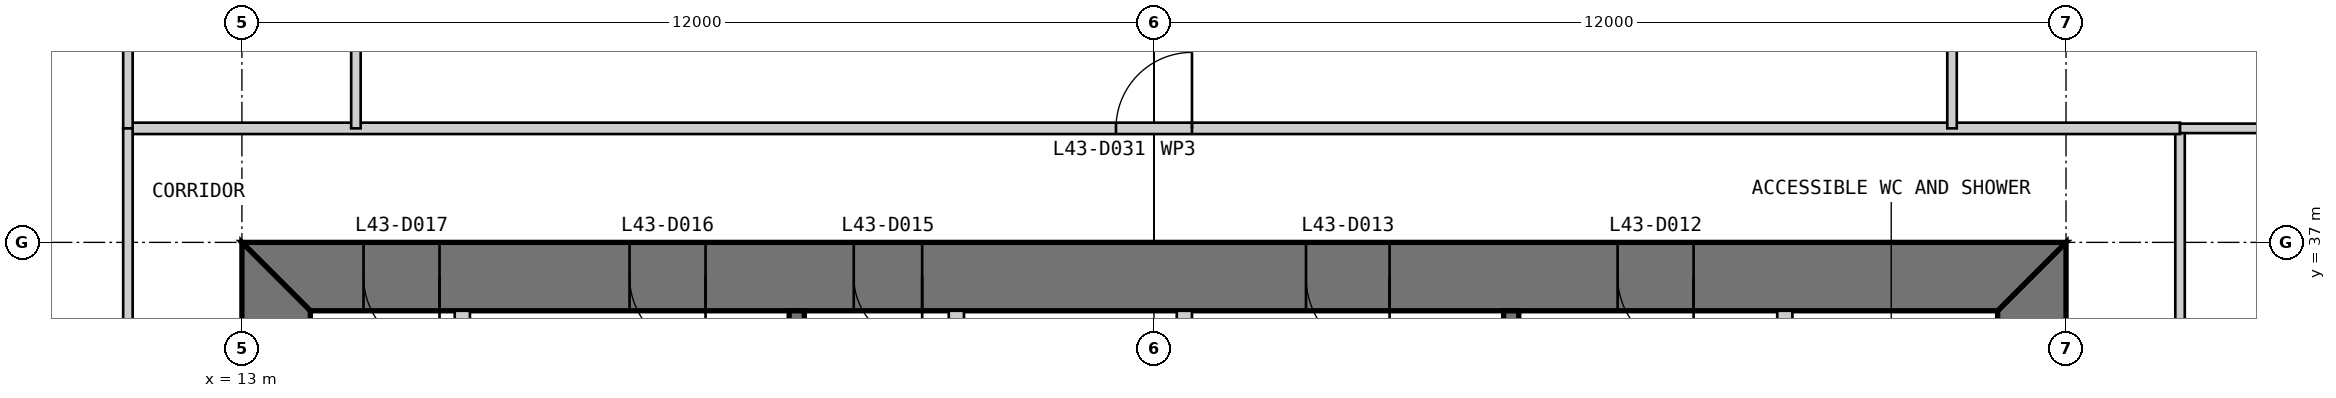
"""IFC4 building model, lengths in metres.
Left out: names, types, materials, properties, quantities, classifications, styles, units other than length and angle.
Written with IfcOpenShell. Run it as: python <this file> out.ifc"""

import sys

from ifc_helpers import new_model, si_unit, direction, frame, frame_2d, origin, place, context, subcontext, project, spatial, polyline, rectangle, outline, extrude, element, fill, save


model = new_model("IFC4")
c1 = context("Model", 3, precision=1e-05, world=origin(), true_north=direction((0.0, 1.0)))
c2 = subcontext(c1, "Body", "Model", "MODEL_VIEW")
j1 = project(units=[si_unit("LENGTHUNIT", "METRE"), si_unit("PLANEANGLEUNIT", "RADIAN")], contexts=[c1])
p1 = place(None, origin())
s1 = spatial("IfcSite", under=j1, at=p1, CompositionType="ELEMENT")
p2 = place(p1, origin())
s2 = spatial("IfcBuilding", under=s1, at=p2, CompositionType="ELEMENT")
p3 = place(p2, frame((0.0, 0.0, 185.8)))
s3 = spatial("IfcBuildingStorey", under=s2, at=p3, CompositionType="ELEMENT", Elevation=185.8)
p4 = place(p3, frame((36.55, 13.9, 0.0), z_axis=(0.0, 0.0, 1.0), x_axis=(0.0, 1.0, 0.0)))
e1 = element("IfcWall", 1, at=p4, inside=s3, PredefinedType="SHEAR", context=c2, shape_type="SweptSolid", body=[
    extrude(outline(polyline([(-0.9, -0.45), (23.1, -0.45), (22.2, 0.45), (0.0, 0.45), (-0.9, -0.45)])), origin(), (0.0, 0.0, 1.0), 4.0),
])
p5 = place(p4, frame((20.2, 0.0, 0.0)))
e2 = element("IfcOpeningElement", 2, at=p5, cuts=e1, PredefinedType="OPENING", context=c2, shape_type="SweptSolid", body=[
    extrude(rectangle(XDim=1.0, YDim=2.2, at=frame_2d((0.5, 1.1))), frame((0.0, 0.46, 0.0), z_axis=(0.0, -1.0, 0.0), x_axis=(1.0, 0.0, 0.0)), (0.0, 0.0, 1.0), 0.92),
])
p6 = place(p4, frame((17.25, 0.0, 0.0)))
e3 = element("IfcOpeningElement", 3, at=p6, cuts=e1, PredefinedType="OPENING", context=c2, shape_type="SweptSolid", body=[
    extrude(rectangle(XDim=0.9, YDim=2.2, at=frame_2d((0.45, 1.1))), frame((0.0, 0.46, 0.0), z_axis=(0.0, -1.0, 0.0), x_axis=(1.0, 0.0, 0.0)), (0.0, 0.0, 1.0), 0.92),
])
p7 = place(p3, frame((37.0, 36.55, 0.0), z_axis=(0.0, 0.0, 1.0), x_axis=(-1.0, 0.0, 0.0)))
e4 = element("IfcWall", 4, at=p7, inside=s3, PredefinedType="SHEAR", context=c2, shape_type="SweptSolid", body=[
    extrude(outline(polyline([(0.0, -0.45), (24.0, -0.45), (23.1, 0.45), (0.9, 0.45), (0.0, -0.45)])), origin(), (0.0, 0.0, 1.0), 4.0),
])
p8 = place(p7, frame((4.9, 0.0, 0.0)))
e5 = element("IfcOpeningElement", 5, at=p8, cuts=e4, PredefinedType="OPENING", context=c2, shape_type="SweptSolid", body=[
    extrude(rectangle(XDim=1.0, YDim=2.2, at=frame_2d((0.5, 1.1))), frame((0.0, 0.46, 0.0), z_axis=(0.0, -1.0, 0.0), x_axis=(1.0, 0.0, 0.0)), (0.0, 0.0, 1.0), 0.92),
])
p9 = place(p7, frame((8.9, 0.0, 0.0)))
e6 = element("IfcOpeningElement", 6, at=p9, cuts=e4, PredefinedType="OPENING", context=c2, shape_type="SweptSolid", body=[
    extrude(rectangle(XDim=1.1, YDim=2.2, at=frame_2d((0.55, 1.1))), frame((0.0, 0.46, 0.0), z_axis=(0.0, -1.0, 0.0), x_axis=(1.0, 0.0, 0.0)), (0.0, 0.0, 1.0), 0.92),
])
p10 = place(p7, frame((15.05, 0.0, 0.0)))
e7 = element("IfcOpeningElement", 7, at=p10, cuts=e4, PredefinedType="OPENING", context=c2, shape_type="SweptSolid", body=[
    extrude(rectangle(XDim=0.9, YDim=2.2, at=frame_2d((0.45, 1.1))), frame((0.0, 0.46, 0.0), z_axis=(0.0, -1.0, 0.0), x_axis=(1.0, 0.0, 0.0)), (0.0, 0.0, 1.0), 0.92),
])
p11 = place(p7, frame((17.9, 0.0, 0.0)))
e8 = element("IfcOpeningElement", 8, at=p11, cuts=e4, PredefinedType="OPENING", context=c2, shape_type="SweptSolid", body=[
    extrude(rectangle(XDim=1.0, YDim=2.2, at=frame_2d((0.5, 1.1))), frame((0.0, 0.46, 0.0), z_axis=(0.0, -1.0, 0.0), x_axis=(1.0, 0.0, 0.0)), (0.0, 0.0, 1.0), 0.92),
])
p12 = place(p7, frame((21.4, 0.0, 0.0)))
e9 = element("IfcOpeningElement", 9, at=p12, cuts=e4, PredefinedType="OPENING", context=c2, shape_type="SweptSolid", body=[
    extrude(rectangle(XDim=1.0, YDim=2.2, at=frame_2d((0.5, 1.1))), frame((0.0, 0.46, 0.0), z_axis=(0.0, -1.0, 0.0), x_axis=(1.0, 0.0, 0.0)), (0.0, 0.0, 1.0), 0.92),
])
p13 = place(p3, frame((13.45, 36.1, 0.0), z_axis=(0.0, 0.0, 1.0), x_axis=(0.0, -1.0, 0.0)))
e10 = element("IfcWall", 10, at=p13, inside=s3, PredefinedType="SHEAR", context=c2, shape_type="SweptSolid", body=[
    extrude(outline(polyline([(-0.9, -0.45), (23.1, -0.45), (22.2, 0.45), (0.0, 0.45), (-0.9, -0.45)])), origin(), (0.0, 0.0, 1.0), 4.0),
])
p14 = place(p13, frame((20.2, 0.0, 0.0)))
e11 = element("IfcOpeningElement", 11, at=p14, cuts=e10, PredefinedType="OPENING", context=c2, shape_type="SweptSolid", body=[
    extrude(rectangle(XDim=1.0, YDim=2.2, at=frame_2d((0.5, 1.1))), frame((0.0, 0.46, 0.0), z_axis=(0.0, -1.0, 0.0), x_axis=(1.0, 0.0, 0.0)), (0.0, 0.0, 1.0), 0.92),
])
p15 = place(p13, frame((17.25, 0.0, 0.0)))
e12 = element("IfcOpeningElement", 12, at=p15, cuts=e10, PredefinedType="OPENING", context=c2, shape_type="SweptSolid", body=[
    extrude(rectangle(XDim=0.9, YDim=2.2, at=frame_2d((0.45, 1.1))), frame((0.0, 0.46, 0.0), z_axis=(0.0, -1.0, 0.0), x_axis=(1.0, 0.0, 0.0)), (0.0, 0.0, 1.0), 0.92),
])
p16 = place(p3, frame((33.3, 36.1, 0.0), z_axis=(0.0, 0.0, 1.0), x_axis=(0.0, -1.0, 0.0)))
e13 = element("IfcWall", 13, at=p16, inside=s3, PredefinedType="PARTITIONING", context=c2, shape_type="SweptSolid", body=[
    extrude(rectangle(XDim=16.1, YDim=0.2, at=frame_2d((8.05, 0.0))), origin(), (0.0, 0.0, 1.0), 3.8),
])
p17 = place(p16, frame((4.4, 0.0, 0.0)))
e14 = element("IfcOpeningElement", 14, at=p17, cuts=e13, PredefinedType="OPENING", context=c2, shape_type="SweptSolid", body=[
    extrude(rectangle(XDim=0.9, YDim=2.2, at=frame_2d((0.45, 1.1))), frame((0.0, 0.11, 0.0), z_axis=(0.0, -1.0, 0.0), x_axis=(1.0, 0.0, 0.0)), (0.0, 0.0, 1.0), 0.22),
])
p18 = place(p3, frame((29.7, 36.1, 0.0), z_axis=(0.0, 0.0, 1.0), x_axis=(0.0, -1.0, 0.0)))
e15 = element("IfcWall", 15, at=p18, inside=s3, PredefinedType="SOLIDWALL", context=c2, shape_type="SweptSolid", body=[
    extrude(rectangle(XDim=16.1, YDim=0.2, at=frame_2d((8.05, 0.0))), origin(), (0.0, 0.0, 1.0), 3.8),
])
p19 = place(p18, frame((7.217, 0.0, 0.0)))
e16 = element("IfcOpeningElement", 16, at=p19, cuts=e15, PredefinedType="OPENING", context=c2, shape_type="SweptSolid", body=[
    extrude(rectangle(XDim=1.1, YDim=2.2, at=frame_2d((0.55, 1.1))), frame((0.0, 0.11, 0.0), z_axis=(0.0, -1.0, 0.0), x_axis=(1.0, 0.0, 0.0)), (0.0, 0.0, 1.0), 0.22),
])
p20 = place(p18, frame((10.55, 0.0, 0.0)))
e17 = element("IfcOpeningElement", 17, at=p20, cuts=e15, PredefinedType="OPENING", context=c2, shape_type="SweptSolid", body=[
    extrude(rectangle(XDim=1.1, YDim=2.2, at=frame_2d((0.55, 1.1))), frame((0.0, 0.11, 0.0), z_axis=(0.0, -1.0, 0.0), x_axis=(1.0, 0.0, 0.0)), (0.0, 0.0, 1.0), 0.22),
])
p21 = place(p18, frame((13.883, 0.0, 0.0)))
e18 = element("IfcOpeningElement", 18, at=p21, cuts=e15, PredefinedType="OPENING", context=c2, shape_type="SweptSolid", body=[
    extrude(rectangle(XDim=1.1, YDim=2.2, at=frame_2d((0.55, 1.1))), frame((0.0, 0.11, 0.0), z_axis=(0.0, -1.0, 0.0), x_axis=(1.0, 0.0, 0.0)), (0.0, 0.0, 1.0), 0.22),
])
p22 = place(p3, frame((25.4, 36.1, 0.0), z_axis=(0.0, 0.0, 1.0), x_axis=(0.0, -1.0, 0.0)))
e19 = element("IfcWall", 19, at=p22, inside=s3, PredefinedType="PARTITIONING", context=c2, shape_type="SweptSolid", body=[
    extrude(rectangle(XDim=3.3, YDim=0.2, at=frame_2d((1.65, 0.0))), origin(), (0.0, 0.0, 1.0), 3.8),
])
p23 = place(p22, frame((0.9, 0.0, 0.0)))
e20 = element("IfcOpeningElement", 20, at=p23, cuts=e19, PredefinedType="OPENING", context=c2, shape_type="SweptSolid", body=[
    extrude(rectangle(XDim=1.1, YDim=2.2, at=frame_2d((0.55, 1.1))), frame((0.0, 0.11, 0.0), z_axis=(0.0, -1.0, 0.0), x_axis=(1.0, 0.0, 0.0)), (0.0, 0.0, 1.0), 0.22),
])
p24 = place(p3, frame((22.4, 36.1, 0.0), z_axis=(0.0, 0.0, 1.0), x_axis=(0.0, -1.0, 0.0)))
e21 = element("IfcWall", 21, at=p24, inside=s3, PredefinedType="PARTITIONING", context=c2, shape_type="SweptSolid", body=[
    extrude(rectangle(XDim=3.3, YDim=0.2, at=frame_2d((1.65, 0.0))), origin(), (0.0, 0.0, 1.0), 3.8),
])
p25 = place(p3, frame((20.3, 36.1, 0.0), z_axis=(0.0, 0.0, 1.0), x_axis=(0.0, -1.0, 0.0)))
e22 = element("IfcWall", 22, at=p25, inside=s3, PredefinedType="SOLIDWALL", context=c2, shape_type="SweptSolid", body=[
    extrude(rectangle(XDim=6.1, YDim=0.2, at=frame_2d((3.05, 0.0))), origin(), (0.0, 0.0, 1.0), 3.8),
])
p26 = place(p3, frame((15.9, 36.1, 0.0), z_axis=(0.0, 0.0, 1.0), x_axis=(0.0, -1.0, 0.0)))
e23 = element("IfcWall", 23, at=p26, inside=s3, PredefinedType="PARTITIONING", context=c2, shape_type="SweptSolid", body=[
    extrude(rectangle(XDim=6.1, YDim=0.2, at=frame_2d((3.05, 0.0))), origin(), (0.0, 0.0, 1.0), 3.8),
])
p27 = place(p3, frame((38.5, 35.5, 0.0), z_axis=(0.0, 0.0, 1.0), x_axis=(0.0, 1.0, 0.0)))
e24 = element("IfcWall", 24, at=p27, inside=s3, PredefinedType="PARTITIONING", context=c2, shape_type="SweptSolid", body=[
    extrude(rectangle(XDim=3.0, YDim=0.125, at=frame_2d((1.5, 0.0))), origin(), (0.0, 0.0, 1.0), 3.85),
])
p28 = place(p3, frame((38.5, 38.5, 0.0), z_axis=(0.0, 0.0, 1.0), x_axis=(-1.0, 0.0, 0.0)))
e25 = element("IfcWall", 25, at=p28, inside=s3, PredefinedType="PARTITIONING", context=c2, shape_type="SweptSolid", body=[
    extrude(rectangle(XDim=27.0, YDim=0.15, at=frame_2d((13.5, 0.0))), origin(), (0.0, 0.0, 1.0), 3.85),
])
p29 = place(p28, frame((13.0, 0.0, 0.0)))
e26 = element("IfcOpeningElement", 26, at=p29, cuts=e25, PredefinedType="OPENING", context=c2, shape_type="SweptSolid", body=[
    extrude(rectangle(XDim=1.0, YDim=2.2, at=frame_2d((0.5, 1.1))), frame((0.0, 0.085, 0.0), z_axis=(0.0, -1.0, 0.0), x_axis=(1.0, 0.0, 0.0)), (0.0, 0.0, 1.0), 0.17),
])
p30 = place(p3, frame((49.85, 38.5, 0.0), z_axis=(0.0, 0.0, 1.0), x_axis=(-1.0, 0.0, 0.0)))
e27 = element("IfcWall", 27, at=p30, inside=s3, PredefinedType="PARTITIONING", context=c2, shape_type="SweptSolid", body=[
    extrude(rectangle(XDim=11.35, YDim=0.125, at=frame_2d((5.675, 0.0))), origin(), (0.0, 0.0, 1.0), 3.85),
])
p31 = place(p3, frame((35.5, 49.85, 0.0), z_axis=(0.0, 0.0, 1.0), x_axis=(0.0, -1.0, 0.0)))
e28 = element("IfcWall", 28, at=p31, inside=s3, PredefinedType="PARTITIONING", context=c2, shape_type="SweptSolid", body=[
    extrude(rectangle(XDim=11.35, YDim=0.125, at=frame_2d((5.675, 0.0))), origin(), (0.0, 0.0, 1.0), 3.85),
])
p32 = place(p31, frame((7.9, 0.0, 0.0)))
e29 = element("IfcOpeningElement", 29, at=p32, cuts=e28, PredefinedType="OPENING", context=c2, shape_type="SweptSolid", body=[
    extrude(rectangle(XDim=0.9, YDim=2.2, at=frame_2d((0.45, 1.1))), frame((0.0, 0.073, 0.0), z_axis=(0.0, -1.0, 0.0), x_axis=(1.0, 0.0, 0.0)), (0.0, 0.0, 1.0), 0.145),
])
p33 = place(p3, frame((14.5, 44.5, 0.0), z_axis=(0.0, 0.0, 1.0), x_axis=(0.0, -1.0, 0.0)))
e30 = element("IfcWall", 30, at=p33, inside=s3, PredefinedType="PARTITIONING", context=c2, shape_type="SweptSolid", body=[
    extrude(rectangle(XDim=6.0, YDim=0.125, at=frame_2d((3.0, 0.0))), origin(), (0.0, 0.0, 1.0), 3.85),
])
p34 = place(p33, frame((2.55, 0.0, 0.0)))
e31 = element("IfcOpeningElement", 31, at=p34, cuts=e30, PredefinedType="OPENING", context=c2, shape_type="SweptSolid", body=[
    extrude(rectangle(XDim=0.9, YDim=2.2, at=frame_2d((0.45, 1.1))), frame((0.0, 0.073, 0.0), z_axis=(0.0, -1.0, 0.0), x_axis=(1.0, 0.0, 0.0)), (0.0, 0.0, 1.0), 0.145),
])
p35 = place(p3, frame((11.5, 49.85, 0.0), z_axis=(0.0, 0.0, 1.0), x_axis=(0.0, -1.0, 0.0)))
e32 = element("IfcWall", 32, at=p35, inside=s3, PredefinedType="PARTITIONING", context=c2, shape_type="SweptSolid", body=[
    extrude(rectangle(XDim=11.35, YDim=0.125, at=frame_2d((5.675, 0.0))), origin(), (0.0, 0.0, 1.0), 3.85),
])
p36 = place(p3, frame((11.5, 38.5, 0.0), z_axis=(0.0, 0.0, 1.0), x_axis=(0.0, -1.0, 0.0)))
e33 = element("IfcWall", 33, at=p36, inside=s3, PredefinedType="PARTITIONING", context=c2, shape_type="SweptSolid", body=[
    extrude(rectangle(XDim=3.0, YDim=0.125, at=frame_2d((1.5, 0.0))), origin(), (0.0, 0.0, 1.0), 3.85),
])
p37 = place(p8, origin())
e34 = element("IfcDoor", 34, at=p37, inside=s3, OperationType="SINGLE_SWING_LEFT", PredefinedType="DOOR", context=c2, shape_type="SweptSolid", body=[
    extrude(rectangle(XDim=1.0, YDim=2.2, at=frame_2d((0.5, 1.1))), frame((0.0, 0.025, 0.0), z_axis=(0.0, -1.0, 0.0), x_axis=(1.0, 0.0, 0.0)), (0.0, 0.0, 1.0), 0.05),
    extrude(outline(polyline([(0.0, 0.0), (0.04, 0.0), (0.04, 2.16), (0.96, 2.16), (0.96, 0.0), (1.0, 0.0), (1.0, 2.2), (0.0, 2.2), (0.0, 0.0)])), frame((0.0, 0.3, 0.0), z_axis=(0.0, -1.0, 0.0), x_axis=(1.0, 0.0, 0.0)), (0.0, 0.0, 1.0), 0.6),
])
fill(e5, e34)
p38 = place(p9, origin())
e35 = element("IfcDoor", 35, at=p38, inside=s3, OperationType="SINGLE_SWING_LEFT", PredefinedType="DOOR", context=c2, shape_type="SweptSolid", body=[
    extrude(rectangle(XDim=1.1, YDim=2.2, at=frame_2d((0.55, 1.1))), frame((0.0, 0.025, 0.0), z_axis=(0.0, -1.0, 0.0), x_axis=(1.0, 0.0, 0.0)), (0.0, 0.0, 1.0), 0.05),
    extrude(outline(polyline([(0.0, 0.0), (0.04, 0.0), (0.04, 2.16), (1.06, 2.16), (1.06, 0.0), (1.1, 0.0), (1.1, 2.2), (0.0, 2.2), (0.0, 0.0)])), frame((0.0, 0.3, 0.0), z_axis=(0.0, -1.0, 0.0), x_axis=(1.0, 0.0, 0.0)), (0.0, 0.0, 1.0), 0.6),
])
fill(e6, e35)
p39 = place(p10, origin())
e36 = element("IfcDoor", 36, at=p39, inside=s3, OperationType="SINGLE_SWING_LEFT", PredefinedType="DOOR", context=c2, shape_type="SweptSolid", body=[
    extrude(rectangle(XDim=0.9, YDim=2.2, at=frame_2d((0.45, 1.1))), frame((0.0, 0.025, 0.0), z_axis=(0.0, -1.0, 0.0), x_axis=(1.0, 0.0, 0.0)), (0.0, 0.0, 1.0), 0.05),
    extrude(outline(polyline([(0.0, 0.0), (0.04, 0.0), (0.04, 2.16), (0.86, 2.16), (0.86, 0.0), (0.9, 0.0), (0.9, 2.2), (0.0, 2.2), (0.0, 0.0)])), frame((0.0, 0.3, 0.0), z_axis=(0.0, -1.0, 0.0), x_axis=(1.0, 0.0, 0.0)), (0.0, 0.0, 1.0), 0.6),
])
fill(e7, e36)
p40 = place(p11, origin())
e37 = element("IfcDoor", 37, at=p40, inside=s3, OperationType="SINGLE_SWING_LEFT", PredefinedType="DOOR", context=c2, shape_type="SweptSolid", body=[
    extrude(rectangle(XDim=1.0, YDim=2.2, at=frame_2d((0.5, 1.1))), frame((0.0, 0.025, 0.0), z_axis=(0.0, -1.0, 0.0), x_axis=(1.0, 0.0, 0.0)), (0.0, 0.0, 1.0), 0.05),
    extrude(outline(polyline([(0.0, 0.0), (0.04, 0.0), (0.04, 2.16), (0.96, 2.16), (0.96, 0.0), (1.0, 0.0), (1.0, 2.2), (0.0, 2.2), (0.0, 0.0)])), frame((0.0, 0.3, 0.0), z_axis=(0.0, -1.0, 0.0), x_axis=(1.0, 0.0, 0.0)), (0.0, 0.0, 1.0), 0.6),
])
fill(e8, e37)
p41 = place(p12, origin())
e38 = element("IfcDoor", 38, at=p41, inside=s3, OperationType="SINGLE_SWING_LEFT", PredefinedType="DOOR", context=c2, shape_type="SweptSolid", body=[
    extrude(rectangle(XDim=1.0, YDim=2.2, at=frame_2d((0.5, 1.1))), frame((0.0, 0.025, 0.0), z_axis=(0.0, -1.0, 0.0), x_axis=(1.0, 0.0, 0.0)), (0.0, 0.0, 1.0), 0.05),
    extrude(outline(polyline([(0.0, 0.0), (0.04, 0.0), (0.04, 2.16), (0.96, 2.16), (0.96, 0.0), (1.0, 0.0), (1.0, 2.2), (0.0, 2.2), (0.0, 0.0)])), frame((0.0, 0.3, 0.0), z_axis=(0.0, -1.0, 0.0), x_axis=(1.0, 0.0, 0.0)), (0.0, 0.0, 1.0), 0.6),
])
fill(e9, e38)
p42 = place(p29, frame((1.0, 0.0, 0.0), z_axis=(0.0, 0.0, 1.0), x_axis=(-1.0, 0.0, 0.0)))
e39 = element("IfcDoor", 39, at=p42, inside=s3, OperationType="SINGLE_SWING_RIGHT", PredefinedType="DOOR", context=c2, shape_type="SweptSolid", body=[
    extrude(rectangle(XDim=1.0, YDim=2.2, at=frame_2d((0.5, 1.1))), frame((0.0, 0.025, 0.0), z_axis=(0.0, -1.0, 0.0), x_axis=(1.0, 0.0, 0.0)), (0.0, 0.0, 1.0), 0.05),
])
fill(e26, e39)
save(model, sys.argv[1])
